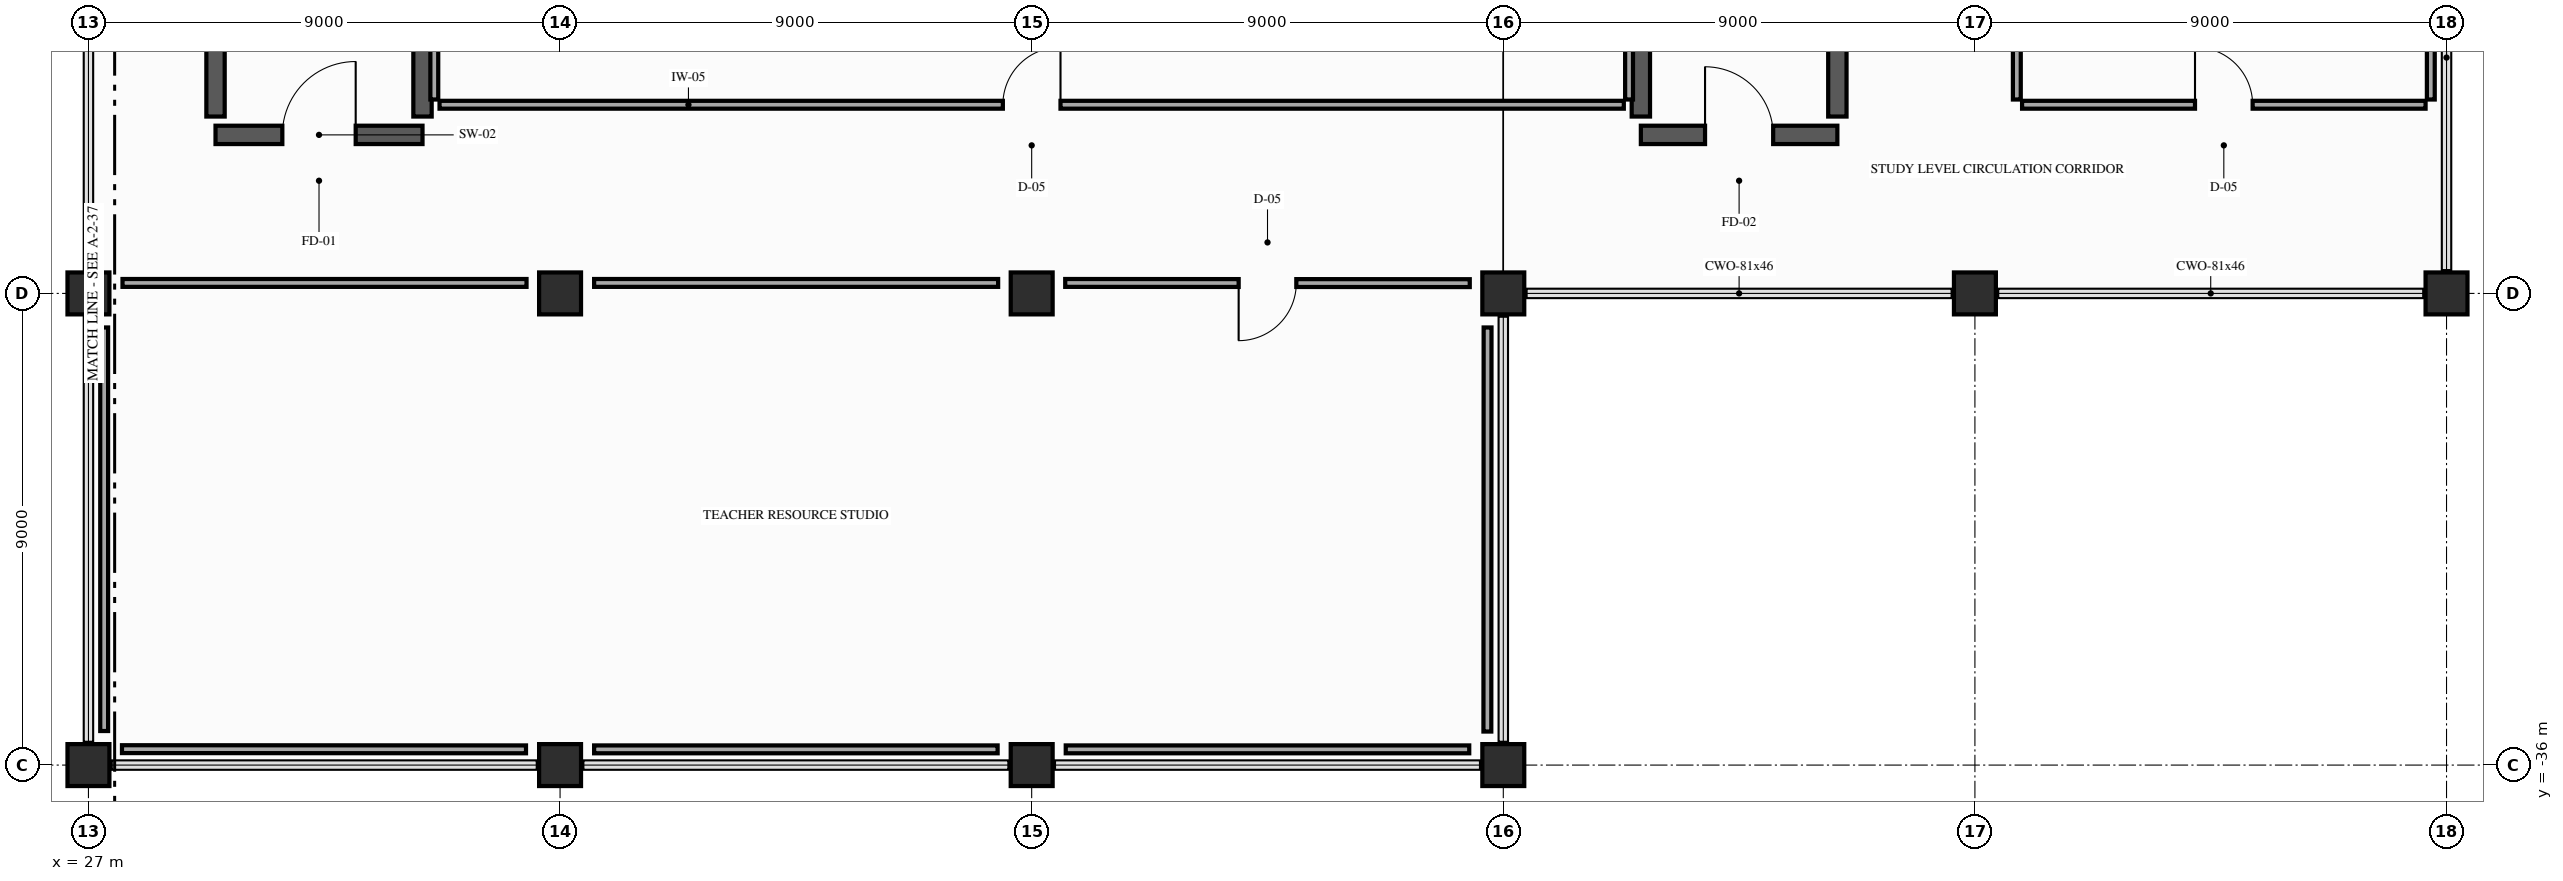
"""IFC4 building model, lengths in metres.
Left out: names, types, materials, properties, quantities, classifications, styles, units other than length and angle.
Written with IfcOpenShell. Run it as: python <this file> out.ifc"""

import sys

from ifc_helpers import new_model, si_unit, direction, frame, frame_2d, origin, origin_2d, place, context, subcontext, project, spatial, rectangle, extrude, element, fill, save


model = new_model("IFC4")
c1 = context("Model", 3, precision=1e-05, world=origin(), true_north=direction((0.0, 1.0)))
c2 = subcontext(c1, "Body", "Model", "MODEL_VIEW")
j1 = project(units=[si_unit("LENGTHUNIT", "METRE"), si_unit("PLANEANGLEUNIT", "RADIAN")], contexts=[c1])
p1 = place(None, origin())
s1 = spatial("IfcSite", under=j1, at=p1, CompositionType="ELEMENT")
p2 = place(p1, origin())
s2 = spatial("IfcBuilding", under=s1, at=p2, CompositionType="ELEMENT")
p3 = place(p2, frame((0.0, 0.0, 16.2)))
s3 = spatial("IfcBuildingStorey", under=s2, at=p3, CompositionType="ELEMENT", Elevation=16.2)
for number, where, z_axis, x_axis in (
    (1, (27.0, -36.0, 0.0), (0.0, 0.0, 1.0), (1.0, 0.0, 0.0)),
    (2, (27.0, -27.0, 0.0), (0.0, 0.0, 1.0), (1.0, 0.0, 0.0)),
    (3, (36.0, -36.0, 0.0), (0.0, 0.0, 1.0), (1.0, 0.0, 0.0)),
    (4, (36.0, -27.0, 0.0), (0.0, 0.0, 1.0), (1.0, 0.0, 0.0)),
    (5, (45.0, -36.0, 0.0), (0.0, 0.0, 1.0), (1.0, 0.0, 0.0)),
    (6, (45.0, -27.0, 0.0), (0.0, 0.0, 1.0), (1.0, 0.0, 0.0)),
    (7, (54.0, -36.0, 0.0), (0.0, 0.0, 1.0), (1.0, 0.0, 0.0)),
    (8, (54.0, -27.0, 0.0), (0.0, 0.0, 1.0), (1.0, 0.0, 0.0)),
    (9, (63.0, -27.0, 0.0), (0.0, 0.0, 1.0), (1.0, 0.0, 0.0)),
    (10, (72.0, -27.0, 0.0), (0.0, 0.0, 1.0), (1.0, 0.0, 0.0)),
):
    element("IfcColumn", number, at=place(p3, frame(where, z_axis=z_axis, x_axis=x_axis)), inside=s3, PredefinedType="COLUMN", context=c2, shape_type="SweptSolid", body=[
        extrude(rectangle(XDim=0.8, YDim=0.8, at=origin_2d()), origin(), (0.0, 0.0, 1.0), 5.4),
    ])
p4 = place(p3, frame((29.425, -23.975, 0.0), z_axis=(0.0, 0.0, 1.0), x_axis=(1.0, 0.0, 0.0)))
e11 = element("IfcWall", 11, at=p4, inside=s3, PredefinedType="SHEAR", context=c2, shape_type="SweptSolid", body=[
    extrude(rectangle(XDim=3.95, YDim=0.35, at=frame_2d((1.975, 0.0))), origin(), (0.0, 0.0, 1.0), 5.15),
])
p5 = place(p4, frame((1.275, 0.0, 0.0)))
e12 = element("IfcOpeningElement", 12, at=p5, cuts=e11, PredefinedType="OPENING", context=c2, shape_type="SweptSolid", body=[
    extrude(rectangle(XDim=1.4, YDim=2.2, at=frame_2d((0.7, 1.1))), frame((0.0, 0.185, 0.0), z_axis=(0.0, -1.0, 0.0), x_axis=(1.0, 0.0, 0.0)), (0.0, 0.0, 1.0), 0.37),
])
for number, where, z_axis, x_axis in (
    (13, (29.425, -23.625, 0.0), (0.0, 0.0, 1.0), (0.0, 1.0, 0.0)),
    (14, (33.375, -23.625, 0.0), (0.0, 0.0, 1.0), (0.0, 1.0, 0.0)),
):
    element("IfcWall", number, at=place(p3, frame(where, z_axis=z_axis, x_axis=x_axis)), inside=s3, PredefinedType="SHEAR", context=c2, shape_type="SweptSolid", body=[
        extrude(rectangle(XDim=9.1, YDim=0.35, at=frame_2d((4.55, 0.0))), origin(), (0.0, 0.0, 1.0), 5.15),
    ])
p6 = place(p3, frame((56.625, -23.975, 0.0), z_axis=(0.0, 0.0, 1.0), x_axis=(1.0, 0.0, 0.0)))
e15 = element("IfcWall", 15, at=p6, inside=s3, PredefinedType="SHEAR", context=c2, shape_type="SweptSolid", body=[
    extrude(rectangle(XDim=3.75, YDim=0.35, at=frame_2d((1.875, 0.0))), origin(), (0.0, 0.0, 1.0), 5.15),
])
p7 = place(p6, frame((1.225, 0.0, 0.0)))
e16 = element("IfcOpeningElement", 16, at=p7, cuts=e15, PredefinedType="OPENING", context=c2, shape_type="SweptSolid", body=[
    extrude(rectangle(XDim=1.3, YDim=2.2, at=frame_2d((0.65, 1.1))), frame((0.0, 0.185, 0.0), z_axis=(0.0, -1.0, 0.0), x_axis=(1.0, 0.0, 0.0)), (0.0, 0.0, 1.0), 0.37),
])
for number, where, z_axis, x_axis in (
    (17, (56.625, -23.625, 0.0), (0.0, 0.0, 1.0), (0.0, 1.0, 0.0)),
    (18, (60.375, -23.625, 0.0), (0.0, 0.0, 1.0), (0.0, 1.0, 0.0)),
):
    element("IfcWall", number, at=place(p3, frame(where, z_axis=z_axis, x_axis=x_axis)), inside=s3, PredefinedType="SHEAR", context=c2, shape_type="SweptSolid", body=[
        extrude(rectangle(XDim=9.1, YDim=0.35, at=frame_2d((4.55, 0.0))), origin(), (0.0, 0.0, 1.0), 5.15),
    ])
p8 = place(p3, frame((33.6, -9.39, 0.0), z_axis=(0.0, 0.0, 1.0), x_axis=(0.0, -1.0, 0.0)))
e19 = element("IfcWall", 19, at=p8, inside=s3, PredefinedType="PARTITIONING", context=c2, shape_type="SweptSolid", body=[
    extrude(rectangle(XDim=13.91, YDim=0.15, at=frame_2d((6.955, 0.0))), origin(), (0.0, 0.0, 1.0), 4.635),
])
p9 = place(p3, frame((33.7, -23.4, 0.0), z_axis=(0.0, 0.0, 1.0), x_axis=(1.0, 0.0, 0.0)))
e20 = element("IfcWall", 20, at=p9, inside=s3, PredefinedType="PARTITIONING", context=c2, shape_type="SweptSolid", body=[
    extrude(rectangle(XDim=22.6, YDim=0.15, at=frame_2d((11.3, 0.0))), origin(), (0.0, 0.0, 1.0), 4.685),
])
p10 = place(p9, frame((10.75, 0.0, 0.0)))
e21 = element("IfcOpeningElement", 21, at=p10, cuts=e20, PredefinedType="OPENING", context=c2, shape_type="SweptSolid", body=[
    extrude(rectangle(XDim=1.1, YDim=2.15, at=frame_2d((0.55, 1.075))), frame((0.0, 0.085, 0.0), z_axis=(0.0, -1.0, 0.0), x_axis=(1.0, 0.0, 0.0)), (0.0, 0.0, 1.0), 0.17),
])
p11 = place(p3, frame((56.4, -23.3, 0.0), z_axis=(0.0, 0.0, 1.0), x_axis=(0.0, 1.0, 0.0)))
e22 = element("IfcWall", 22, at=p11, inside=s3, PredefinedType="PARTITIONING", context=c2, shape_type="SweptSolid", body=[
    extrude(rectangle(XDim=13.9, YDim=0.15, at=frame_2d((6.95, 0.0))), origin(), (0.0, 0.0, 1.0), 4.635),
])
p12 = place(p3, frame((63.8, -18.175, 0.0), z_axis=(0.0, 0.0, 1.0), x_axis=(0.0, -1.0, 0.0)))
e23 = element("IfcWall", 23, at=p12, inside=s3, PredefinedType="PARTITIONING", context=c2, shape_type="SweptSolid", body=[
    extrude(rectangle(XDim=5.125, YDim=0.15, at=frame_2d((2.562, 0.0))), origin(), (0.0, 0.0, 1.0), 4.635),
])
p13 = place(p3, frame((63.9, -23.4, 0.0), z_axis=(0.0, 0.0, 1.0), x_axis=(1.0, 0.0, 0.0)))
e24 = element("IfcWall", 24, at=p13, inside=s3, PredefinedType="PARTITIONING", context=c2, shape_type="SweptSolid", body=[
    extrude(rectangle(XDim=7.7, YDim=0.15, at=frame_2d((3.85, 0.0))), origin(), (0.0, 0.0, 1.0), 4.685),
])
p14 = place(p13, frame((3.3, 0.0, 0.0)))
e25 = element("IfcOpeningElement", 25, at=p14, cuts=e24, PredefinedType="OPENING", context=c2, shape_type="SweptSolid", body=[
    extrude(rectangle(XDim=1.1, YDim=2.15, at=frame_2d((0.55, 1.075))), frame((0.0, 0.085, 0.0), z_axis=(0.0, -1.0, 0.0), x_axis=(1.0, 0.0, 0.0)), (0.0, 0.0, 1.0), 0.17),
])
p15 = place(p3, frame((71.7, -23.3, 0.0), z_axis=(0.0, 0.0, 1.0), x_axis=(0.0, 1.0, 0.0)))
e26 = element("IfcWall", 26, at=p15, inside=s3, PredefinedType="PARTITIONING", context=c2, shape_type="SweptSolid", body=[
    extrude(rectangle(XDim=4.65, YDim=0.15, at=frame_2d((2.325, 0.0))), origin(), (0.0, 0.0, 1.0), 4.685),
])
p16 = place(p3, frame((27.3, -27.65, 0.0), z_axis=(0.0, 0.0, 1.0), x_axis=(0.0, -1.0, 0.0)))
e27 = element("IfcWall", 27, at=p16, inside=s3, PredefinedType="PARTITIONING", context=c2, shape_type="SweptSolid", body=[
    extrude(rectangle(XDim=7.7, YDim=0.15, at=frame_2d((3.85, 0.0))), origin(), (0.0, 0.0, 1.0), 4.685),
])
p17 = place(p3, frame((27.64, -35.696, 0.0), z_axis=(0.0, 0.0, 1.0), x_axis=(0.999999871661, -0.00050663367, 0.0)))
e28 = element("IfcWall", 28, at=p17, inside=s3, PredefinedType="PARTITIONING", context=c2, shape_type="SweptSolid", body=[
    extrude(rectangle(XDim=7.71, YDim=0.15, at=frame_2d((3.855, 0.0))), origin(), (0.0, 0.0, 1.0), 4.635),
])
for number, where, z_axis, x_axis in (
    (29, (36.65, -35.7, 0.0), (0.0, 0.0, 1.0), (1.0, 0.0, 0.0)),
    (30, (45.65, -35.7, 0.0), (0.0, 0.0, 1.0), (1.0, 0.0, 0.0)),
):
    element("IfcWall", number, at=place(p3, frame(where, z_axis=z_axis, x_axis=x_axis)), inside=s3, PredefinedType="PARTITIONING", context=c2, shape_type="SweptSolid", body=[
        extrude(rectangle(XDim=7.7, YDim=0.15, at=frame_2d((3.85, 0.0))), origin(), (0.0, 0.0, 1.0), 4.635),
    ])
p18 = place(p3, frame((53.696, -35.36, 0.0), z_axis=(0.0, 0.0, 1.0), x_axis=(0.00050663367, 0.999999871661, 0.0)))
e31 = element("IfcWall", 31, at=p18, inside=s3, PredefinedType="PARTITIONING", context=c2, shape_type="SweptSolid", body=[
    extrude(rectangle(XDim=7.71, YDim=0.15, at=frame_2d((3.855, 0.0))), origin(), (0.0, 0.0, 1.0), 4.685),
])
p19 = place(p3, frame((53.36, -26.804, 0.0), z_axis=(0.0, 0.0, 1.0), x_axis=(-0.999999871994, 0.000505976787, 0.0)))
e32 = element("IfcWall", 32, at=p19, inside=s3, PredefinedType="PARTITIONING", context=c2, shape_type="SweptSolid", body=[
    extrude(rectangle(XDim=7.72, YDim=0.15, at=frame_2d((3.86, 0.0))), origin(), (0.0, 0.0, 1.0), 4.635),
])
p20 = place(p19, frame((3.31, 0.0, 0.0)))
e33 = element("IfcOpeningElement", 33, at=p20, cuts=e32, PredefinedType="OPENING", context=c2, shape_type="SweptSolid", body=[
    extrude(rectangle(XDim=1.1, YDim=2.15, at=frame_2d((0.55, 1.075))), frame((0.0, 0.085, 0.0), z_axis=(0.0, -1.0, 0.0), x_axis=(1.0, 0.0, 0.0)), (0.0, 0.0, 1.0), 0.17),
])
for number, where, z_axis, x_axis in (
    (34, (44.36, -26.8, 0.0), (0.0, 0.0, 1.0), (-1.0, 0.0, 0.0)),
    (35, (35.36, -26.8, 0.0), (0.0, 0.0, 1.0), (-1.0, 0.0, 0.0)),
):
    element("IfcWall", number, at=place(p3, frame(where, z_axis=z_axis, x_axis=x_axis)), inside=s3, PredefinedType="PARTITIONING", context=c2, shape_type="SweptSolid", body=[
        extrude(rectangle(XDim=7.71, YDim=0.15, at=frame_2d((3.855, 0.0))), origin(), (0.0, 0.0, 1.0), 4.635),
    ])
p21 = place(p5, origin())
e36 = element("IfcDoor", 36, at=p21, inside=s3, OperationType="SINGLE_SWING_RIGHT", PredefinedType="DOOR", context=c2, shape_type="SweptSolid", body=[
    extrude(rectangle(XDim=1.4, YDim=2.2, at=frame_2d((0.7, 1.1))), frame((0.0, 0.025, 0.0), z_axis=(0.0, -1.0, 0.0), x_axis=(1.0, 0.0, 0.0)), (0.0, 0.0, 1.0), 0.05),
])
fill(e12, e36)
p22 = place(p7, origin())
e37 = element("IfcDoor", 37, at=p22, inside=s3, OperationType="SINGLE_SWING_LEFT", PredefinedType="DOOR", context=c2, shape_type="SweptSolid", body=[
    extrude(rectangle(XDim=1.3, YDim=2.2, at=frame_2d((0.65, 1.1))), frame((0.0, 0.025, 0.0), z_axis=(0.0, -1.0, 0.0), x_axis=(1.0, 0.0, 0.0)), (0.0, 0.0, 1.0), 0.05),
])
fill(e16, e37)
p23 = place(p10, origin())
e38 = element("IfcDoor", 38, at=p23, inside=s3, OperationType="SINGLE_SWING_RIGHT", PredefinedType="DOOR", context=c2, shape_type="SweptSolid", body=[
    extrude(rectangle(XDim=1.1, YDim=2.15, at=frame_2d((0.55, 1.075))), frame((0.0, 0.025, 0.0), z_axis=(0.0, -1.0, 0.0), x_axis=(1.0, 0.0, 0.0)), (0.0, 0.0, 1.0), 0.05),
])
fill(e21, e38)
p24 = place(p14, origin())
e39 = element("IfcDoor", 39, at=p24, inside=s3, OperationType="SINGLE_SWING_LEFT", PredefinedType="DOOR", context=c2, shape_type="SweptSolid", body=[
    extrude(rectangle(XDim=1.1, YDim=2.15, at=frame_2d((0.55, 1.075))), frame((0.0, 0.025, 0.0), z_axis=(0.0, -1.0, 0.0), x_axis=(1.0, 0.0, 0.0)), (0.0, 0.0, 1.0), 0.05),
])
fill(e25, e39)
p25 = place(p20, origin())
e40 = element("IfcDoor", 40, at=p25, inside=s3, OperationType="SINGLE_SWING_RIGHT", PredefinedType="DOOR", context=c2, shape_type="SweptSolid", body=[
    extrude(rectangle(XDim=1.1, YDim=2.15, at=frame_2d((0.55, 1.075))), frame((0.0, 0.025, 0.0), z_axis=(0.0, -1.0, 0.0), x_axis=(1.0, 0.0, 0.0)), (0.0, 0.0, 1.0), 0.05),
])
fill(e33, e40)
save(model, sys.argv[1])
